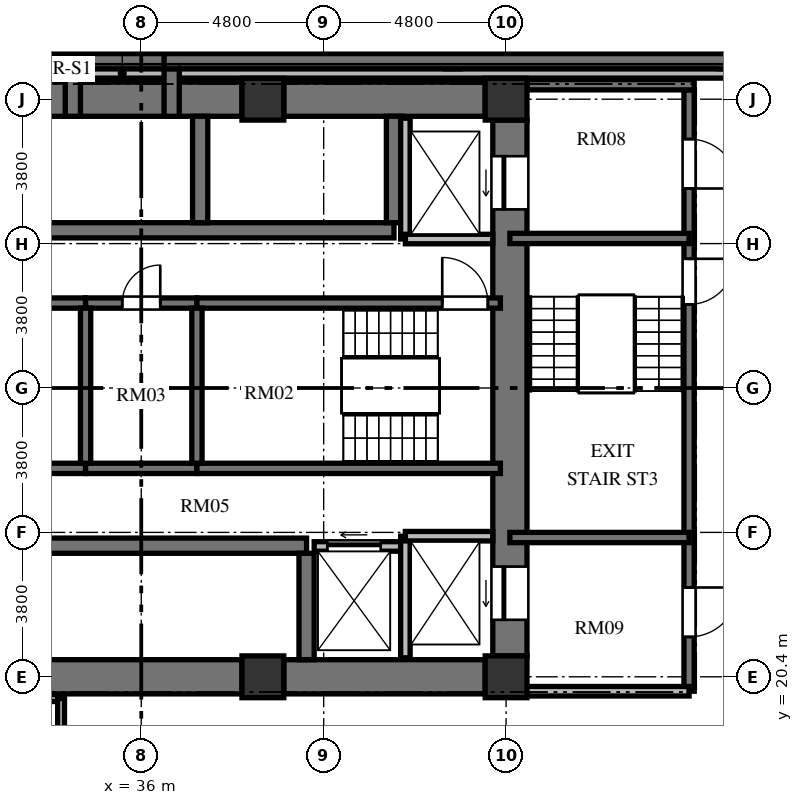
"""IFC4 building model, lengths in metres.
Left out: names, types, materials, properties, quantities, classifications, styles, units other than length and angle.
Written with IfcOpenShell. Run it as: python <this file> out.ifc"""

import sys

from ifc_helpers import new_model, si_unit, direction, frame, frame_2d, origin, origin_2d, place, context, subcontext, project, spatial, rectangle, extrude, element, fill, save


model = new_model("IFC4")
c1 = context("Model", 3, precision=1e-05, world=origin(), true_north=direction((0.0, 1.0)))
c2 = subcontext(c1, "Body", "Model", "MODEL_VIEW")
j1 = project(units=[si_unit("LENGTHUNIT", "METRE"), si_unit("PLANEANGLEUNIT", "RADIAN")], contexts=[c1])
p1 = place(None, origin())
s1 = spatial("IfcSite", under=j1, at=p1, CompositionType="ELEMENT")
p2 = place(p1, origin())
s2 = spatial("IfcBuilding", under=s1, at=p2, CompositionType="ELEMENT")
p3 = place(p2, frame((0.0, 0.0, -5.4)))
s3 = spatial("IfcBuildingStorey", under=s2, at=p3, CompositionType="ELEMENT", Elevation=-5.4)
for number, where, z_axis, x_axis in (
    (1, (39.2, 20.4, 0.0), (0.0, 0.0, 1.0), (1.0, 0.0, 0.0)),
    (2, (45.6, 20.4, 0.0), (0.0, 0.0, 1.0), (1.0, 0.0, 0.0)),
    (3, (45.6, 35.6, 0.0), (0.0, 0.0, 1.0), (1.0, 0.0, 0.0)),
    (4, (39.2, 35.6, 0.0), (0.0, 0.0, 1.0), (1.0, 0.0, 0.0)),
):
    element("IfcColumn", number, at=place(p3, frame(where, z_axis=z_axis, x_axis=x_axis)), inside=s3, PredefinedType="COLUMN", context=c2, shape_type="SweptSolid", body=[
        extrude(rectangle(XDim=1.1, YDim=1.1, at=origin_2d()), origin(), (0.0, 0.0, 1.0), 5.4),
    ])
p4 = place(p3, frame((45.7, 20.95, 0.0), z_axis=(0.0, 0.0, 1.0), x_axis=(0.0, 1.0, 0.0)))
e5 = element("IfcWall", 5, at=p4, inside=s3, PredefinedType="SHEAR", context=c2, shape_type="SweptSolid", body=[
    extrude(rectangle(XDim=14.1, YDim=0.9, at=frame_2d((7.05, 0.0))), origin(), (0.0, 0.0, 1.0), 5.4),
])
p5 = place(p4, frame((11.75, 0.0, 0.0)))
e6 = element("IfcOpeningElement", 6, at=p5, cuts=e5, PredefinedType="OPENING", context=c2, shape_type="SweptSolid", body=[
    extrude(rectangle(XDim=1.4, YDim=2.3, at=frame_2d((0.7, 1.15))), frame((0.0, 0.46, 0.0), z_axis=(0.0, -1.0, 0.0), x_axis=(1.0, 0.0, 0.0)), (0.0, 0.0, 1.0), 0.92),
])
p6 = place(p4, frame((0.95, 0.0, 0.0)))
e7 = element("IfcOpeningElement", 7, at=p6, cuts=e5, PredefinedType="OPENING", context=c2, shape_type="SweptSolid", body=[
    extrude(rectangle(XDim=1.4, YDim=2.3, at=frame_2d((0.7, 1.15))), frame((0.0, 0.46, 0.0), z_axis=(0.0, -1.0, 0.0), x_axis=(1.0, 0.0, 0.0)), (0.0, 0.0, 1.0), 0.92),
])
for number, where, z_axis, x_axis in (
    (8, (33.35, 20.4, 0.0), (0.0, 0.0, 1.0), (1.0, 0.0, 0.0)),
    (9, (33.35, 35.6, 0.0), (0.0, 0.0, 1.0), (1.0, 0.0, 0.0)),
):
    element("IfcWall", number, at=place(p3, frame(where, z_axis=z_axis, x_axis=x_axis)), inside=s3, PredefinedType="SHEAR", context=c2, shape_type="SweptSolid", body=[
        extrude(rectangle(XDim=5.3, YDim=0.9, at=frame_2d((2.65, 0.0))), origin(), (0.0, 0.0, 1.0), 5.4),
    ])
for number, where, z_axis, x_axis in (
    (10, (39.75, 20.4, 0.0), (0.0, 0.0, 1.0), (1.0, 0.0, 0.0)),
    (11, (39.75, 35.6, 0.0), (0.0, 0.0, 1.0), (1.0, 0.0, 0.0)),
):
    element("IfcWall", number, at=place(p3, frame(where, z_axis=z_axis, x_axis=x_axis)), inside=s3, PredefinedType="SHEAR", context=c2, shape_type="SweptSolid", body=[
        extrude(rectangle(XDim=5.3, YDim=0.9, at=frame_2d((2.65, 0.0))), origin(), (0.0, 0.0, 1.0), 5.4),
    ])
p7 = place(p3, frame((26.74, 32.15, 0.0), z_axis=(0.0, 0.0, 1.0), x_axis=(1.0, 0.0, 0.0)))
e12 = element("IfcWall", 12, at=p7, inside=s3, PredefinedType="SHEAR", context=c2, shape_type="SweptSolid", body=[
    extrude(rectangle(XDim=15.91, YDim=0.4, at=frame_2d((7.955, 0.0))), origin(), (0.0, 0.0, 1.0), 5.4),
])
p8 = place(p7, frame((2.21, 0.0, 0.0)))
e13 = element("IfcOpeningElement", 13, at=p8, cuts=e12, PredefinedType="OPENING", context=c2, shape_type="SweptSolid", body=[
    extrude(rectangle(XDim=1.1, YDim=2.15, at=frame_2d((0.55, 1.075))), frame((0.0, 0.21, 0.0), z_axis=(0.0, -1.0, 0.0), x_axis=(1.0, 0.0, 0.0)), (0.0, 0.0, 1.0), 0.42),
])
p9 = place(p3, frame((26.74, 23.85, 0.0), z_axis=(0.0, 0.0, 1.0), x_axis=(1.0, 0.0, 0.0)))
e14 = element("IfcWall", 14, at=p9, inside=s3, PredefinedType="SHEAR", context=c2, shape_type="SweptSolid", body=[
    extrude(rectangle(XDim=13.61, YDim=0.4, at=frame_2d((6.805, 0.0))), origin(), (0.0, 0.0, 1.0), 5.4),
])
p10 = place(p9, frame((2.21, 0.0, 0.0)))
e15 = element("IfcOpeningElement", 15, at=p10, cuts=e14, PredefinedType="OPENING", context=c2, shape_type="SweptSolid", body=[
    extrude(rectangle(XDim=1.1, YDim=2.15, at=frame_2d((0.55, 1.075))), frame((0.0, 0.21, 0.0), z_axis=(0.0, -1.0, 0.0), x_axis=(1.0, 0.0, 0.0)), (0.0, 0.0, 1.0), 0.42),
])
for number, where, z_axis, x_axis in (
    (16, (37.55, 32.35, 0.0), (0.0, 0.0, 1.0), (0.0, 1.0, 0.0)),
    (17, (42.65, 32.35, 0.0), (0.0, 0.0, 1.0), (0.0, 1.0, 0.0)),
    (18, (40.35, 20.85, 0.0), (0.0, 0.0, 1.0), (0.0, 1.0, 0.0)),
):
    element("IfcWall", number, at=place(p3, frame(where, z_axis=z_axis, x_axis=x_axis)), inside=s3, PredefinedType="SHEAR", context=c2, shape_type="SweptSolid", body=[
        extrude(rectangle(XDim=2.8, YDim=0.4, at=frame_2d((1.4, 0.0))), origin(), (0.0, 0.0, 1.0), 5.4),
    ])
p11 = place(p3, frame((26.55, 30.235, 0.0), z_axis=(0.0, 0.0, 1.0), x_axis=(1.0, 0.0, 0.0)))
e19 = element("IfcWall", 19, at=p11, inside=s3, PredefinedType="SHEAR", context=c2, shape_type="SweptSolid", body=[
    extrude(rectangle(XDim=7.985, YDim=0.27, at=frame_2d((3.992, 0.0))), origin(), (0.0, 0.0, 1.0), 5.4),
])
p12 = place(p3, frame((34.535, 30.235, 0.0), z_axis=(0.0, 0.0, 1.0), x_axis=(1.0, 0.0, 0.0)))
e20 = element("IfcWall", 20, at=p12, inside=s3, PredefinedType="SHEAR", context=c2, shape_type="SweptSolid", body=[
    extrude(rectangle(XDim=2.93, YDim=0.27, at=frame_2d((1.465, 0.0))), origin(), (0.0, 0.0, 1.0), 5.4),
])
p13 = place(p12, frame((0.965, 0.0, 0.0)))
e21 = element("IfcOpeningElement", 21, at=p13, cuts=e20, PredefinedType="OPENING", context=c2, shape_type="SweptSolid", body=[
    extrude(rectangle(XDim=1.0, YDim=2.1, at=frame_2d((0.5, 1.05))), frame((0.0, 0.145, 0.0), z_axis=(0.0, -1.0, 0.0), x_axis=(1.0, 0.0, 0.0)), (0.0, 0.0, 1.0), 0.29),
])
p14 = place(p3, frame((37.465, 30.235, 0.0), z_axis=(0.0, 0.0, 1.0), x_axis=(1.0, 0.0, 0.0)))
e22 = element("IfcWall", 22, at=p14, inside=s3, PredefinedType="SHEAR", context=c2, shape_type="SweptSolid", body=[
    extrude(rectangle(XDim=7.985, YDim=0.27, at=frame_2d((3.992, 0.0))), origin(), (0.0, 0.0, 1.0), 5.4),
])
p15 = place(p14, frame((6.455, 0.0, 0.0)))
e23 = element("IfcOpeningElement", 23, at=p15, cuts=e22, PredefinedType="OPENING", context=c2, shape_type="SweptSolid", body=[
    extrude(rectangle(XDim=1.2, YDim=2.15, at=frame_2d((0.6, 1.075))), frame((0.0, 0.145, 0.0), z_axis=(0.0, -1.0, 0.0), x_axis=(1.0, 0.0, 0.0)), (0.0, 0.0, 1.0), 0.29),
])
p16 = place(p3, frame((26.55, 25.885, 0.0), z_axis=(0.0, 0.0, 1.0), x_axis=(1.0, 0.0, 0.0)))
e24 = element("IfcWall", 24, at=p16, inside=s3, PredefinedType="SHEAR", context=c2, shape_type="SweptSolid", body=[
    extrude(rectangle(XDim=7.985, YDim=0.27, at=frame_2d((3.992, 0.0))), origin(), (0.0, 0.0, 1.0), 5.4),
])
p17 = place(p3, frame((34.535, 25.885, 0.0), z_axis=(0.0, 0.0, 1.0), x_axis=(1.0, 0.0, 0.0)))
e25 = element("IfcWall", 25, at=p17, inside=s3, PredefinedType="SHEAR", context=c2, shape_type="SweptSolid", body=[
    extrude(rectangle(XDim=2.93, YDim=0.27, at=frame_2d((1.465, 0.0))), origin(), (0.0, 0.0, 1.0), 5.4),
])
p18 = place(p3, frame((37.465, 25.885, 0.0), z_axis=(0.0, 0.0, 1.0), x_axis=(1.0, 0.0, 0.0)))
e26 = element("IfcWall", 26, at=p18, inside=s3, PredefinedType="SHEAR", context=c2, shape_type="SweptSolid", body=[
    extrude(rectangle(XDim=7.985, YDim=0.27, at=frame_2d((3.992, 0.0))), origin(), (0.0, 0.0, 1.0), 5.4),
])
for number, where, z_axis, x_axis in (
    (27, (34.535, 26.02, 0.0), (0.0, 0.0, 1.0), (0.0, 1.0, 0.0)),
    (28, (37.465, 26.02, 0.0), (0.0, 0.0, 1.0), (0.0, 1.0, 0.0)),
):
    element("IfcWall", number, at=place(p3, frame(where, z_axis=z_axis, x_axis=x_axis)), inside=s3, PredefinedType="SHEAR", context=c2, shape_type="SweptSolid", body=[
        extrude(rectangle(XDim=4.08, YDim=0.27, at=frame_2d((2.04, 0.0))), origin(), (0.0, 0.0, 1.0), 5.4),
    ])
p19 = place(p3, frame((40.55, 23.83, 0.0), z_axis=(0.0, 0.0, 1.0), x_axis=(1.0, 0.0, 0.0)))
e29 = element("IfcWall", 29, at=p19, inside=s3, PredefinedType="SOLIDWALL", context=c2, shape_type="SweptSolid", body=[
    extrude(rectangle(XDim=2.4, YDim=0.25, at=frame_2d((1.2, 0.0))), origin(), (0.0, 0.0, 1.0), 5.12),
])
p20 = place(p19, frame((0.35, 0.0, 0.0)))
e30 = element("IfcOpeningElement", 30, at=p20, cuts=e29, PredefinedType="OPENING", context=c2, shape_type="SweptSolid", body=[
    extrude(rectangle(XDim=1.4, YDim=2.3, at=frame_2d((0.7, 1.15))), frame((0.0, 0.135, 0.0), z_axis=(0.0, -1.0, 0.0), x_axis=(1.0, 0.0, 0.0)), (0.0, 0.0, 1.0), 0.27),
])
p21 = place(p3, frame((42.95, 31.92, 0.0), z_axis=(0.0, 0.0, 1.0), x_axis=(0.0, 1.0, 0.0)))
e31 = element("IfcWall", 31, at=p21, inside=s3, PredefinedType="SOLIDWALL", context=c2, shape_type="SweptSolid", body=[
    extrude(rectangle(XDim=3.18, YDim=0.25, at=frame_2d((1.59, 0.0))), origin(), (0.0, 0.0, 1.0), 5.12),
])
p22 = place(p3, frame((42.95, 31.92, 0.0), z_axis=(0.0, 0.0, 1.0), x_axis=(1.0, 0.0, 0.0)))
e32 = element("IfcWall", 32, at=p22, inside=s3, PredefinedType="SOLIDWALL", context=c2, shape_type="SweptSolid", body=[
    extrude(rectangle(XDim=2.3, YDim=0.25, at=frame_2d((1.15, 0.0))), origin(), (0.0, 0.0, 1.0), 5.12),
])
p23 = place(p3, frame((42.95, 20.9, 0.0), z_axis=(0.0, 0.0, 1.0), x_axis=(0.0, 1.0, 0.0)))
e33 = element("IfcWall", 33, at=p23, inside=s3, PredefinedType="SOLIDWALL", context=c2, shape_type="SweptSolid", body=[
    extrude(rectangle(XDim=3.2, YDim=0.25, at=frame_2d((1.6, 0.0))), origin(), (0.0, 0.0, 1.0), 5.12),
])
p24 = place(p3, frame((42.95, 24.1, 0.0), z_axis=(0.0, 0.0, 1.0), x_axis=(1.0, 0.0, 0.0)))
e34 = element("IfcWall", 34, at=p24, inside=s3, PredefinedType="SOLIDWALL", context=c2, shape_type="SweptSolid", body=[
    extrude(rectangle(XDim=2.3, YDim=0.25, at=frame_2d((1.15, 0.0))), origin(), (0.0, 0.0, 1.0), 5.12),
])
p25 = place(p3, frame((50.415, 35.845, 0.0), z_axis=(0.0, 0.0, 1.0), x_axis=(0.0, -1.0, 0.0)))
e35 = element("IfcWall", 35, at=p25, inside=s3, PredefinedType="SHEAR", context=c2, shape_type="SweptSolid", body=[
    extrude(rectangle(XDim=15.825, YDim=0.27, at=frame_2d((7.913, 0.0))), origin(), (0.0, 0.0, 1.0), 5.4),
])
p26 = place(p25, frame((4.445, 0.0, 0.0)))
e36 = element("IfcOpeningElement", 36, at=p26, cuts=e35, PredefinedType="OPENING", context=c2, shape_type="SweptSolid", body=[
    extrude(rectangle(XDim=1.2, YDim=2.15, at=frame_2d((0.6, 1.075))), frame((0.0, 0.145, 0.0), z_axis=(0.0, -1.0, 0.0), x_axis=(1.0, 0.0, 0.0)), (0.0, 0.0, 1.0), 0.29),
])
p27 = place(p25, frame((1.295, 0.0, 0.0)))
e37 = element("IfcOpeningElement", 37, at=p27, cuts=e35, PredefinedType="OPENING", context=c2, shape_type="SweptSolid", body=[
    extrude(rectangle(XDim=1.3, YDim=2.2, at=frame_2d((0.65, 1.1))), frame((0.0, 0.145, 0.0), z_axis=(0.0, -1.0, 0.0), x_axis=(1.0, 0.0, 0.0)), (0.0, 0.0, 1.0), 0.29),
])
p28 = place(p25, frame((13.095, 0.0, 0.0)))
e38 = element("IfcOpeningElement", 38, at=p28, cuts=e35, PredefinedType="OPENING", context=c2, shape_type="SweptSolid", body=[
    extrude(rectangle(XDim=1.3, YDim=2.2, at=frame_2d((0.65, 1.1))), frame((0.0, 0.145, 0.0), z_axis=(0.0, -1.0, 0.0), x_axis=(1.0, 0.0, 0.0)), (0.0, 0.0, 1.0), 0.29),
])
p29 = place(p3, frame((46.15, 35.98, 0.0), z_axis=(0.0, 0.0, 1.0), x_axis=(1.0, 0.0, 0.0)))
e39 = element("IfcWall", 39, at=p29, inside=s3, PredefinedType="SHEAR", context=c2, shape_type="SweptSolid", body=[
    extrude(rectangle(XDim=4.4, YDim=0.27, at=frame_2d((2.2, 0.0))), origin(), (0.0, 0.0, 1.0), 5.4),
])
for number, where, z_axis, x_axis in (
    (40, (45.7, 31.935, 0.0), (0.0, 0.0, 1.0), (1.0, 0.0, 0.0)),
    (41, (45.7, 24.065, 0.0), (0.0, 0.0, 1.0), (1.0, 0.0, 0.0)),
):
    element("IfcWall", number, at=place(p3, frame(where, z_axis=z_axis, x_axis=x_axis)), inside=s3, PredefinedType="SHEAR", context=c2, shape_type="SweptSolid", body=[
        extrude(rectangle(XDim=4.715, YDim=0.27, at=frame_2d((2.357, 0.0))), origin(), (0.0, 0.0, 1.0), 5.4),
    ])
p30 = place(p3, frame((45.7, 20.02, 0.0), z_axis=(0.0, 0.0, 1.0), x_axis=(1.0, 0.0, 0.0)))
e42 = element("IfcWall", 42, at=p30, inside=s3, PredefinedType="SOLIDWALL", context=c2, shape_type="SweptSolid", body=[
    extrude(rectangle(XDim=4.715, YDim=0.25, at=frame_2d((2.357, 0.0))), origin(), (0.0, 0.0, 1.0), 5.12),
])
p31 = place(p3, frame((12.25, 36.28, 0.0), z_axis=(0.0, 0.0, 1.0), x_axis=(1.0, 0.0, 0.0)))
e43 = element("IfcWall", 43, at=p31, inside=s3, PredefinedType="SOLIDWALL", context=c2, shape_type="SweptSolid", body=[
    extrude(rectangle(XDim=46.5, YDim=0.25, at=frame_2d((23.25, 0.0))), origin(), (0.0, 0.0, 1.0), 5.12),
])
p32 = place(p3, frame((30.31, 19.84, 0.0), z_axis=(0.0, 0.0, 1.0), x_axis=(1.0, 0.0, 0.0)))
e44 = element("IfcWall", 44, at=p32, inside=s3, PredefinedType="PARTITIONING", context=c2, shape_type="SweptSolid", body=[
    extrude(rectangle(XDim=3.57, YDim=0.18, at=frame_2d((1.785, 0.0))), origin(), (0.0, 0.0, 1.0), 5.12),
])
p33 = place(p3, frame((33.89, 17.47, 0.0), z_axis=(0.0, 0.0, 1.0), x_axis=(0.0, 1.0, 0.0)))
e45 = element("IfcWall", 45, at=p33, inside=s3, PredefinedType="PARTITIONING", context=c2, shape_type="SweptSolid", body=[
    extrude(rectangle(XDim=2.36, YDim=0.18, at=frame_2d((1.18, 0.0))), origin(), (0.0, 0.0, 1.0), 5.12),
])
p34 = place(p3, frame((19.4, 36.6, 0.0), z_axis=(0.0, 0.0, 1.0), x_axis=(1.0, 0.0, 0.0)))
e46 = element("IfcWall", 46, at=p34, inside=s3, PredefinedType="SHEAR", context=c2, shape_type="SweptSolid", body=[
    extrude(rectangle(XDim=15.0, YDim=0.4, at=frame_2d((7.5, 0.0))), origin(), (0.0, 0.0, 1.0), 0.6),
])
for number, where, z_axis, x_axis in (
    (47, (34.2, 35.15, 0.0), (0.0, 0.0, 1.0), (0.0, 1.0, 0.0)),
    (48, (36.8, 35.15, 0.0), (0.0, 0.0, 1.0), (0.0, 1.0, 0.0)),
):
    element("IfcWall", number, at=place(p3, frame(where, z_axis=z_axis, x_axis=x_axis)), inside=s3, PredefinedType="SHEAR", context=c2, shape_type="SweptSolid", body=[
        extrude(rectangle(XDim=7.85, YDim=0.4, at=frame_2d((3.925, 0.0))), origin(), (0.0, 0.0, 1.0), 2.4),
    ])
p35 = place(p3, frame((34.0, 36.6, 0.0), z_axis=(0.0, 0.0, 1.0), x_axis=(1.0, 0.0, 0.0)))
e49 = element("IfcWall", 49, at=p35, inside=s3, PredefinedType="SHEAR", context=c2, shape_type="SweptSolid", body=[
    extrude(rectangle(XDim=3.0, YDim=0.4, at=frame_2d((1.5, 0.0))), origin(), (0.0, 0.0, 1.0), 2.4),
])
p36 = place(p3, frame((44.2, 36.4, 0.0), z_axis=(0.0, 0.0, 1.0), x_axis=(0.0, 1.0, 0.0)))
e50 = element("IfcWall", 50, at=p36, inside=s3, PredefinedType="SHEAR", context=c2, shape_type="SweptSolid", body=[
    extrude(rectangle(XDim=6.6, YDim=0.4, at=frame_2d((3.3, 0.0))), origin(), (0.0, 0.0, 1.0), 3.3),
])
p37 = place(p3, frame((51.4, 36.4, 0.0), z_axis=(0.0, 0.0, 1.0), x_axis=(0.0, 1.0, 0.0)))
e51 = element("IfcWall", 51, at=p37, inside=s3, PredefinedType="SHEAR", context=c2, shape_type="SweptSolid", body=[
    extrude(rectangle(XDim=6.6, YDim=0.4, at=frame_2d((3.3, 0.0))), origin(), (0.0, 0.0, 1.0), 4.2),
])
p38 = place(p3, frame((36.6, 36.6, 0.0), z_axis=(0.0, 0.0, 1.0), x_axis=(1.0, 0.0, 0.0)))
e52 = element("IfcWall", 52, at=p38, inside=s3, PredefinedType="SHEAR", context=c2, shape_type="SweptSolid", body=[
    extrude(rectangle(XDim=22.0, YDim=0.4, at=frame_2d((11.0, 0.0))), origin(), (0.0, 0.0, 1.0), 2.4),
])
p39 = place(p15, origin())
e53 = element("IfcDoor", 53, at=p39, inside=s3, OperationType="SINGLE_SWING_LEFT", PredefinedType="DOOR", context=c2, shape_type="SweptSolid", body=[
    extrude(rectangle(XDim=1.2, YDim=2.15, at=frame_2d((0.6, 1.075))), frame((0.0, 0.025, 0.0), z_axis=(0.0, -1.0, 0.0), x_axis=(1.0, 0.0, 0.0)), (0.0, 0.0, 1.0), 0.05),
])
fill(e23, e53)
p40 = place(p13, origin())
e54 = element("IfcDoor", 54, at=p40, inside=s3, OperationType="SINGLE_SWING_RIGHT", PredefinedType="DOOR", context=c2, shape_type="SweptSolid", body=[
    extrude(rectangle(XDim=1.0, YDim=2.1, at=frame_2d((0.5, 1.05))), frame((0.0, 0.025, 0.0), z_axis=(0.0, -1.0, 0.0), x_axis=(1.0, 0.0, 0.0)), (0.0, 0.0, 1.0), 0.05),
])
fill(e21, e54)
p41 = place(p5, origin())
e55 = element("IfcDoor", 55, at=p41, inside=s3, OperationType="SLIDING_TO_LEFT", PredefinedType="DOOR", context=c2, shape_type="SweptSolid", body=[
    extrude(rectangle(XDim=1.4, YDim=2.3, at=frame_2d((0.7, 1.15))), frame((0.0, 0.025, 0.0), z_axis=(0.0, -1.0, 0.0), x_axis=(1.0, 0.0, 0.0)), (0.0, 0.0, 1.0), 0.05),
])
fill(e6, e55)
p42 = place(p6, origin())
e56 = element("IfcDoor", 56, at=p42, inside=s3, OperationType="SLIDING_TO_LEFT", PredefinedType="DOOR", context=c2, shape_type="SweptSolid", body=[
    extrude(rectangle(XDim=1.4, YDim=2.3, at=frame_2d((0.7, 1.15))), frame((0.0, 0.025, 0.0), z_axis=(0.0, -1.0, 0.0), x_axis=(1.0, 0.0, 0.0)), (0.0, 0.0, 1.0), 0.05),
])
fill(e7, e56)
p43 = place(p20, origin())
e57 = element("IfcDoor", 57, at=p43, inside=s3, OperationType="SLIDING_TO_LEFT", PredefinedType="DOOR", context=c2, shape_type="SweptSolid", body=[
    extrude(rectangle(XDim=1.4, YDim=2.3, at=frame_2d((0.7, 1.15))), frame((0.0, 0.025, 0.0), z_axis=(0.0, -1.0, 0.0), x_axis=(1.0, 0.0, 0.0)), (0.0, 0.0, 1.0), 0.05),
])
fill(e30, e57)
p44 = place(p26, origin())
e58 = element("IfcDoor", 58, at=p44, inside=s3, OperationType="SINGLE_SWING_LEFT", PredefinedType="DOOR", context=c2, shape_type="SweptSolid", body=[
    extrude(rectangle(XDim=1.2, YDim=2.15, at=frame_2d((0.6, 1.075))), frame((0.0, 0.025, 0.0), z_axis=(0.0, -1.0, 0.0), x_axis=(1.0, 0.0, 0.0)), (0.0, 0.0, 1.0), 0.05),
])
fill(e36, e58)
p45 = place(p27, origin())
e59 = element("IfcDoor", 59, at=p45, inside=s3, OperationType="SINGLE_SWING_RIGHT", PredefinedType="DOOR", context=c2, shape_type="SweptSolid", body=[
    extrude(rectangle(XDim=1.3, YDim=2.2, at=frame_2d((0.65, 1.1))), frame((0.0, 0.025, 0.0), z_axis=(0.0, -1.0, 0.0), x_axis=(1.0, 0.0, 0.0)), (0.0, 0.0, 1.0), 0.05),
])
fill(e37, e59)
p46 = place(p28, origin())
e60 = element("IfcDoor", 60, at=p46, inside=s3, OperationType="SINGLE_SWING_LEFT", PredefinedType="DOOR", context=c2, shape_type="SweptSolid", body=[
    extrude(rectangle(XDim=1.3, YDim=2.2, at=frame_2d((0.65, 1.1))), frame((0.0, 0.025, 0.0), z_axis=(0.0, -1.0, 0.0), x_axis=(1.0, 0.0, 0.0)), (0.0, 0.0, 1.0), 0.05),
])
fill(e38, e60)
save(model, sys.argv[1])
